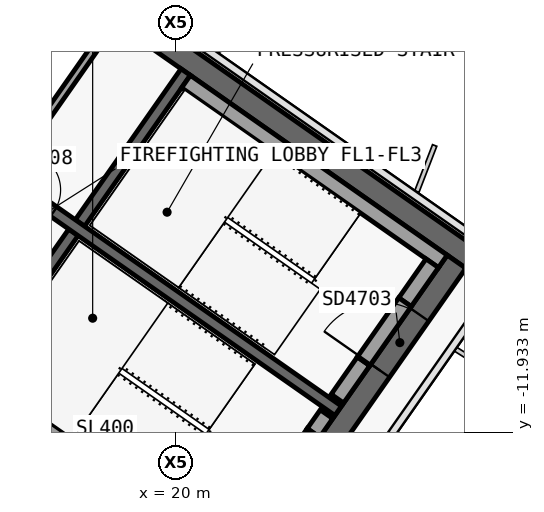
"""IFC4 building model, lengths in metres.
Left out: names, types, materials, properties, quantities, classifications, styles, units other than length and angle.
Written with IfcOpenShell. Run it as: python <this file> out.ifc"""

import sys

from ifc_helpers import new_model, si_unit, direction, frame, frame_2d, origin, place, context, subcontext, project, spatial, polyline, rectangle, outline, extrude, element, fill, save


model = new_model("IFC4")
c1 = context("Model", 3, precision=1e-05, world=origin(), true_north=direction((0.0, 1.0)))
c2 = subcontext(c1, "Body", "Model", "MODEL_VIEW")
j1 = project(units=[si_unit("LENGTHUNIT", "METRE"), si_unit("PLANEANGLEUNIT", "RADIAN")], contexts=[c1])
p1 = place(None, origin())
s1 = spatial("IfcSite", under=j1, at=p1, CompositionType="ELEMENT")
p2 = place(p1, origin())
s2 = spatial("IfcBuilding", under=s1, at=p2, CompositionType="ELEMENT")
p3 = place(p2, frame((0.0, 0.0, 264.4)))
s3 = spatial("IfcBuildingStorey", under=s2, at=p3, CompositionType="ELEMENT", Elevation=264.4)
p4 = place(p3, frame((0.028, 12.066, 0.0), z_axis=(0.0, 0.0, 1.0), x_axis=(0.819151382952, -0.573577380837, 0.0)))
e1 = element("IfcWall", 1, at=p4, inside=s3, PredefinedType="SHEAR", context=c2, shape_type="SweptSolid", body=[
    extrude(outline(polyline([(33.898, 0.3), (0.0, 0.3), (0.42, -0.3), (33.898, -0.3), (33.898, 0.3)])), origin(), (0.0, 0.0, 1.0), 3.9),
])
p5 = place(p3, frame((0.028, -0.874, 0.0), z_axis=(0.0, 0.0, 1.0), x_axis=(0.819150035022, -0.573579305871, 0.0)))
e2 = element("IfcWall", 2, at=p5, inside=s3, PredefinedType="SHEAR", context=c2, shape_type="SweptSolid", body=[
    extrude(outline(polyline([(26.476, 0.3), (0.0, 0.3), (0.42, -0.3), (26.476, -0.3), (26.476, 0.3)])), origin(), (0.0, 0.0, 1.0), 3.9),
])
p6 = place(p5, frame((6.576, 0.0, 0.0)))
e3 = element("IfcOpeningElement", 3, at=p6, cuts=e2, PredefinedType="OPENING", context=c2, shape_type="SweptSolid", body=[
    extrude(rectangle(XDim=1.5, YDim=2.1, at=frame_2d((0.75, 1.05))), frame((0.0, 0.31, 0.0), z_axis=(0.0, -1.0, 0.0), x_axis=(1.0, 0.0, 0.0)), (0.0, 0.0, 1.0), 0.62),
])
p7 = place(p5, frame((12.226, 0.0, 0.0)))
e4 = element("IfcOpeningElement", 4, at=p7, cuts=e2, PredefinedType="OPENING", context=c2, shape_type="SweptSolid", body=[
    extrude(rectangle(XDim=1.5, YDim=2.1, at=frame_2d((0.75, 1.05))), frame((0.0, 0.31, 0.0), z_axis=(0.0, -1.0, 0.0), x_axis=(1.0, 0.0, 0.0)), (0.0, 0.0, 1.0), 0.62),
])
p8 = place(p3, frame((21.642, -15.642, 0.0), z_axis=(0.0, 0.0, 1.0), x_axis=(0.573586866468, 0.819144740944, 0.0)))
e5 = element("IfcWall", 5, at=p8, inside=s3, PredefinedType="SHEAR", context=c2, shape_type="SweptSolid", body=[
    extrude(outline(polyline([(10.0, 0.3), (0.0, 0.3), (0.0, -0.3), (10.0, -0.3), (10.0, 0.3)])), origin(), (0.0, 0.0, 1.0), 3.9),
])
p9 = place(p8, frame((6.5, 0.0, 0.0)))
e6 = element("IfcOpeningElement", 6, at=p9, cuts=e5, PredefinedType="OPENING", context=c2, shape_type="SweptSolid", body=[
    extrude(rectangle(XDim=1.8, YDim=2.1, at=frame_2d((0.9, 1.05))), frame((0.0, 0.31, 0.0), z_axis=(0.0, -1.0, 0.0), x_axis=(1.0, 0.0, 0.0)), (0.0, 0.0, 1.0), 0.62),
])
p10 = place(p8, frame((2.3, 0.0, 0.0)))
e7 = element("IfcOpeningElement", 7, at=p10, cuts=e5, PredefinedType="OPENING", context=c2, shape_type="SweptSolid", body=[
    extrude(rectangle(XDim=1.8, YDim=2.1, at=frame_2d((0.9, 1.05))), frame((0.0, 0.31, 0.0), z_axis=(0.0, -1.0, 0.0), x_axis=(1.0, 0.0, 0.0)), (0.0, 0.0, 1.0), 0.62),
])
p11 = place(p3, frame((14.515, -10.652, 0.0), z_axis=(0.0, 0.0, 1.0), x_axis=(0.573560315113, 0.819163332265, 0.0)))
e8 = element("IfcWall", 8, at=p11, inside=s3, PredefinedType="SHEAR", context=c2, shape_type="SweptSolid", body=[
    extrude(outline(polyline([(0.0, 0.15), (0.0, -0.15), (4.85, -0.15), (4.85, 0.15), (0.0, 0.15)])), origin(), (0.0, 0.0, 1.0), 3.9),
])
p12 = place(p3, frame((17.469, -6.433, 0.0), z_axis=(0.0, 0.0, 1.0), x_axis=(0.573594092424, 0.81913968109, 0.0)))
e9 = element("IfcWall", 9, at=p12, inside=s3, PredefinedType="SHEAR", context=c2, shape_type="SweptSolid", body=[
    extrude(outline(polyline([(4.85, -0.15), (4.85, 0.15), (0.0, 0.15), (0.0, -0.15), (4.85, -0.15)])), origin(), (0.0, 0.0, 1.0), 3.9),
])
p13 = place(p3, frame((2.638, 3.768, 0.0), z_axis=(0.0, 0.0, 1.0), x_axis=(0.819155014212, -0.573572194837, 0.0)))
e10 = element("IfcWall", 10, at=p13, inside=s3, PredefinedType="SHEAR", context=c2, shape_type="SweptSolid", body=[
    extrude(outline(polyline([(0.0, 0.15), (0.0, -0.15), (26.4, -0.15), (26.4, 0.15), (0.0, 0.15)])), origin(), (0.0, 0.0, 1.0), 3.9),
])
p14 = place(p13, frame((9.637, 0.0, 0.0)))
e11 = element("IfcOpeningElement", 11, at=p14, cuts=e10, PredefinedType="OPENING", context=c2, shape_type="SweptSolid", body=[
    extrude(rectangle(XDim=1.2, YDim=2.1, at=frame_2d((0.6, 1.05))), frame((0.0, 0.16, 0.0), z_axis=(0.0, -1.0, 0.0), x_axis=(1.0, 0.0, 0.0)), (0.0, 0.0, 1.0), 0.32),
])
p15 = place(p13, frame((11.812, 0.0, 0.0)))
e12 = element("IfcOpeningElement", 12, at=p15, cuts=e10, PredefinedType="OPENING", context=c2, shape_type="SweptSolid", body=[
    extrude(rectangle(XDim=1.2, YDim=2.1, at=frame_2d((0.6, 1.05))), frame((0.0, 0.16, 0.0), z_axis=(0.0, -1.0, 0.0), x_axis=(1.0, 0.0, 0.0)), (0.0, 0.0, 1.0), 0.32),
])
p16 = place(p13, frame((13.988, 0.0, 0.0)))
e13 = element("IfcOpeningElement", 13, at=p16, cuts=e10, PredefinedType="OPENING", context=c2, shape_type="SweptSolid", body=[
    extrude(rectangle(XDim=1.2, YDim=2.1, at=frame_2d((0.6, 1.05))), frame((0.0, 0.16, 0.0), z_axis=(0.0, -1.0, 0.0), x_axis=(1.0, 0.0, 0.0)), (0.0, 0.0, 1.0), 0.32),
])
p17 = place(p13, frame((16.262, 0.0, 0.0)))
e14 = element("IfcOpeningElement", 14, at=p17, cuts=e10, PredefinedType="OPENING", context=c2, shape_type="SweptSolid", body=[
    extrude(rectangle(XDim=1.0, YDim=2.1, at=frame_2d((0.5, 1.05))), frame((0.0, 0.16, 0.0), z_axis=(0.0, -1.0, 0.0), x_axis=(1.0, 0.0, 0.0)), (0.0, 0.0, 1.0), 0.32),
])
p18 = place(p3, frame((15.565, -5.1, 0.0), z_axis=(0.0, 0.0, 1.0), x_axis=(0.573560315113, 0.819163332265, 0.0)))
e15 = element("IfcWall", 15, at=p18, inside=s3, PredefinedType="SOLIDWALL", context=c2, shape_type="SweptSolid", body=[
    extrude(rectangle(XDim=4.85, YDim=0.2, at=frame_2d((2.425, 0.0))), origin(), (0.0, 0.0, 1.0), 3.9),
])
p19 = place(p3, frame((20.259, -2.71, 0.0), z_axis=(0.0, 0.0, 1.0), x_axis=(0.81914849389, -0.573581506813, 0.0)))
e16 = element("IfcWall", 16, at=p19, inside=s3, PredefinedType="SOLIDWALL", context=c2, shape_type="SweptSolid", body=[
    extrude(rectangle(XDim=8.25, YDim=0.4, at=frame_2d((4.125, 0.0))), origin(), (0.0, 0.0, 1.0), 3.62),
])
p20 = place(p3, frame((24.244, -11.055, 0.0), z_axis=(0.0, 0.0, 1.0), x_axis=(0.573571582932, 0.819155442668, 0.0)))
e17 = element("IfcWall", 17, at=p20, inside=s3, PredefinedType="SOLIDWALL", context=c2, shape_type="SweptSolid", body=[
    extrude(rectangle(XDim=1.2, YDim=0.4, at=frame_2d((0.6, 0.0))), origin(), (0.0, 0.0, 1.0), 3.62),
])
p21 = place(p3, frame((26.022, -8.515, 0.0), z_axis=(0.0, 0.0, 1.0), x_axis=(0.573619628835, 0.819121798889, 0.0)))
e18 = element("IfcWall", 18, at=p21, inside=s3, PredefinedType="SOLIDWALL", context=c2, shape_type="SweptSolid", body=[
    extrude(rectangle(XDim=1.25, YDim=0.4, at=frame_2d((0.625, 0.0))), origin(), (0.0, 0.0, 1.0), 3.62),
])
p22 = place(p3, frame((24.932, -10.072, 2.15), z_axis=(0.0, 0.0, 1.0), x_axis=(0.573591692345, 0.819141361715, 0.0)))
e19 = element("IfcWall", 19, at=p22, inside=s3, PredefinedType="SOLIDWALL", context=c2, shape_type="SweptSolid", body=[
    extrude(rectangle(XDim=1.9, YDim=0.4, at=frame_2d((0.95, 0.0))), origin(), (0.0, 0.0, 1.0), 1.47),
])
p23 = place(p3, frame((14.753, -10.574, 0.0), z_axis=(0.0, 0.0, 1.0), x_axis=(0.819158229677, -0.573567602601, 0.0)))
e20 = element("IfcWall", 20, at=p23, inside=s3, PredefinedType="SOLIDWALL", context=c2, shape_type="SweptSolid", body=[
    extrude(rectangle(XDim=8.25, YDim=0.4, at=frame_2d((4.125, 0.0))), origin(), (0.0, 0.0, 1.0), 3.62),
])
p24 = place(p3, frame((23.613, -11.956, 0.0), z_axis=(0.0, 0.0, 1.0), x_axis=(0.573435029941, 0.819251039936, 0.0)))
e21 = element("IfcWall", 21, at=p24, inside=s3, PredefinedType="SOLIDWALL", context=c2, shape_type="SweptSolid", body=[
    extrude(rectangle(XDim=0.6, YDim=0.4, at=frame_2d((0.3, 0.0))), origin(), (0.0, 0.0, 1.0), 3.62),
])
p25 = place(p3, frame((22.523, -13.512, 2.15), z_axis=(0.0, 0.0, 1.0), x_axis=(0.573591692345, 0.819141361715, 0.0)))
e22 = element("IfcWall", 22, at=p25, inside=s3, PredefinedType="SOLIDWALL", context=c2, shape_type="SweptSolid", body=[
    extrude(rectangle(XDim=1.9, YDim=0.4, at=frame_2d((0.95, 0.0))), origin(), (0.0, 0.0, 1.0), 1.47),
])
p26 = place(p17, origin())
e23 = element("IfcDoor", 23, at=p26, inside=s3, OperationType="SINGLE_SWING_RIGHT", PredefinedType="DOOR", context=c2, shape_type="SweptSolid", body=[
    extrude(rectangle(XDim=1.0, YDim=2.1, at=frame_2d((0.5, 1.05))), frame((0.0, 0.025, 0.0), z_axis=(0.0, -1.0, 0.0), x_axis=(1.0, 0.0, 0.0)), (0.0, 0.0, 1.0), 0.05),
])
fill(e14, e23)
p27 = place(p9, origin())
e24 = element("IfcDoor", 24, at=p27, inside=s3, OperationType="DOUBLE_DOOR_SINGLE_SWING", PredefinedType="DOOR", context=c2, shape_type="SweptSolid", body=[
    extrude(rectangle(XDim=1.8, YDim=2.1, at=frame_2d((0.9, 1.05))), frame((0.0, 0.025, 0.0), z_axis=(0.0, -1.0, 0.0), x_axis=(1.0, 0.0, 0.0)), (0.0, 0.0, 1.0), 0.05),
])
fill(e6, e24)
save(model, sys.argv[1])
